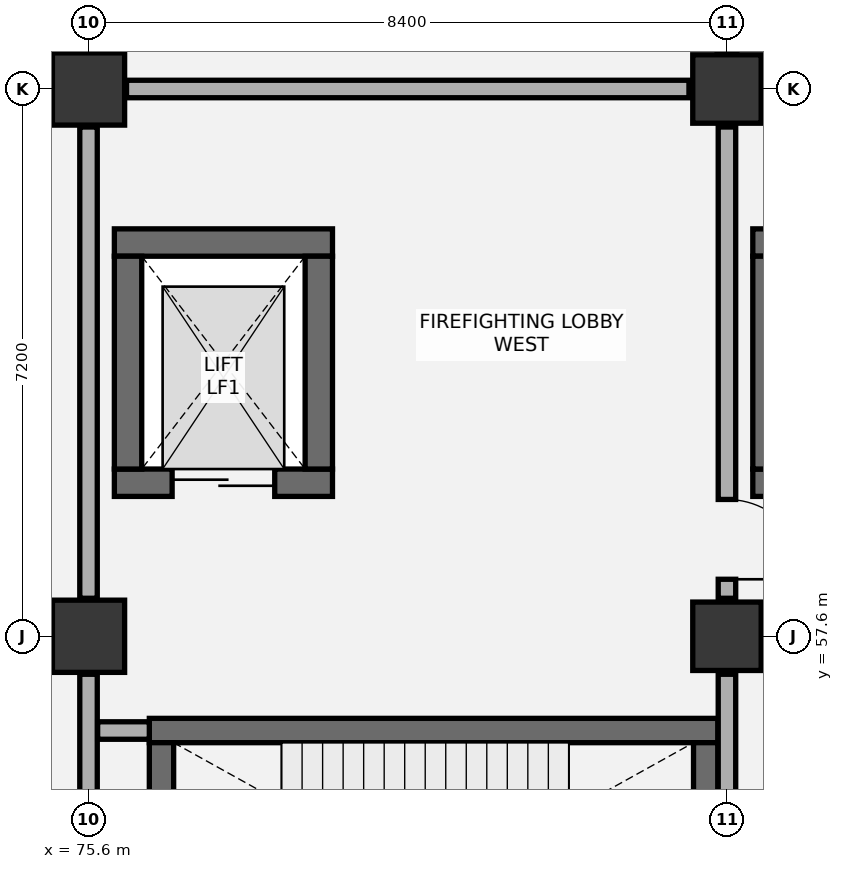
"""IFC4 building model, lengths in metres.
Left out: names, types, materials, properties, quantities, classifications, styles, units other than length and angle.
Written with IfcOpenShell. Run it as: python <this file> out.ifc"""

import sys

from ifc_helpers import new_model, si_unit, direction, frame, frame_2d, origin, origin_2d, place, context, subcontext, project, spatial, rectangle, extrude, element, fill, save


model = new_model("IFC4")
c1 = context("Model", 3, precision=1e-05, world=origin(), true_north=direction((0.0, 1.0)))
c2 = subcontext(c1, "Body", "Model", "MODEL_VIEW")
j1 = project(units=[si_unit("LENGTHUNIT", "METRE"), si_unit("PLANEANGLEUNIT", "RADIAN")], contexts=[c1])
p1 = place(None, origin())
s1 = spatial("IfcSite", under=j1, at=p1, CompositionType="ELEMENT")
p2 = place(p1, origin())
s2 = spatial("IfcBuilding", under=s1, at=p2, CompositionType="ELEMENT")
p3 = place(p2, frame((0.0, 0.0, -4.8)))
s3 = spatial("IfcBuildingStorey", under=s2, at=p3, CompositionType="ELEMENT", Elevation=-4.8)
for number, where, z_axis, x_axis in (
    (1, (75.6, 57.6, 0.0), (0.0, 0.0, 1.0), (1.0, 0.0, 0.0)),
    (2, (75.6, 64.8, 0.0), (0.0, 0.0, 1.0), (1.0, 0.0, 0.0)),
):
    element("IfcColumn", number, at=place(p3, frame(where, z_axis=z_axis, x_axis=x_axis)), inside=s3, PredefinedType="COLUMN", context=c2, shape_type="SweptSolid", body=[
        extrude(rectangle(XDim=0.95, YDim=0.95, at=origin_2d()), origin(), (0.0, 0.0, 1.0), 4.8),
    ])
for number, where, z_axis, x_axis in (
    (3, (84.0, 57.6, 0.0), (0.0, 0.0, 1.0), (1.0, 0.0, 0.0)),
    (4, (84.0, 64.8, 0.0), (0.0, 0.0, 1.0), (1.0, 0.0, 0.0)),
):
    element("IfcColumn", number, at=place(p3, frame(where, z_axis=z_axis, x_axis=x_axis)), inside=s3, PredefinedType="COLUMN", context=c2, shape_type="SweptSolid", body=[
        extrude(rectangle(XDim=0.9, YDim=0.9, at=origin_2d()), origin(), (0.0, 0.0, 1.0), 4.8),
    ])
p4 = place(p3, frame((76.4, 56.36, 0.0), z_axis=(0.0, 0.0, 1.0), x_axis=(1.0, 0.0, 0.0)))
e5 = element("IfcWall", 5, at=p4, inside=s3, PredefinedType="SHEAR", context=c2, shape_type="SweptSolid", body=[
    extrude(rectangle(XDim=7.48, YDim=0.32, at=frame_2d((3.74, 0.0))), origin(), (0.0, 0.0, 1.0), 4.45),
])
for number, where, z_axis, x_axis in (
    (6, (76.56, 52.4, 0.0), (0.0, 0.0, 1.0), (0.0, 1.0, 0.0)),
    (7, (83.72, 52.4, 0.0), (0.0, 0.0, 1.0), (0.0, 1.0, 0.0)),
):
    element("IfcWall", number, at=place(p3, frame(where, z_axis=z_axis, x_axis=x_axis)), inside=s3, PredefinedType="SHEAR", context=c2, shape_type="SweptSolid", body=[
        extrude(rectangle(XDim=3.8, YDim=0.32, at=frame_2d((1.9, 0.0))), origin(), (0.0, 0.0, 1.0), 4.45),
    ])
p5 = place(p3, frame((75.94, 62.78, 0.0), z_axis=(0.0, 0.0, 1.0), x_axis=(1.0, 0.0, 0.0)))
e8 = element("IfcWall", 8, at=p5, inside=s3, PredefinedType="SHEAR", context=c2, shape_type="SweptSolid", body=[
    extrude(rectangle(XDim=2.87, YDim=0.36, at=frame_2d((1.435, 0.0))), origin(), (0.0, 0.0, 1.0), 4.45),
])
p6 = place(p3, frame((75.94, 59.62, 0.0), z_axis=(0.0, 0.0, 1.0), x_axis=(1.0, 0.0, 0.0)))
e9 = element("IfcWall", 9, at=p6, inside=s3, PredefinedType="SHEAR", context=c2, shape_type="SweptSolid", body=[
    extrude(rectangle(XDim=2.87, YDim=0.36, at=frame_2d((1.435, 0.0))), origin(), (0.0, 0.0, 1.0), 4.45),
])
p7 = place(p6, frame((0.76, 0.0, 0.0)))
e10 = element("IfcOpeningElement", 10, at=p7, cuts=e9, PredefinedType="OPENING", context=c2, shape_type="SweptSolid", body=[
    extrude(rectangle(XDim=1.35, YDim=2.2, at=frame_2d((0.675, 1.1))), frame((0.0, 0.19, 0.0), z_axis=(0.0, -1.0, 0.0), x_axis=(1.0, 0.0, 0.0)), (0.0, 0.0, 1.0), 0.38),
])
for number, where, z_axis, x_axis in (
    (11, (76.12, 59.8, 0.0), (0.0, 0.0, 1.0), (0.0, 1.0, 0.0)),
    (12, (78.63, 59.8, 0.0), (0.0, 0.0, 1.0), (0.0, 1.0, 0.0)),
):
    element("IfcWall", number, at=place(p3, frame(where, z_axis=z_axis, x_axis=x_axis)), inside=s3, PredefinedType="SHEAR", context=c2, shape_type="SweptSolid", body=[
        extrude(rectangle(XDim=2.8, YDim=0.36, at=frame_2d((1.4, 0.0))), origin(), (0.0, 0.0, 1.0), 4.45),
    ])
p8 = place(p3, frame((84.34, 62.78, 0.0), z_axis=(0.0, 0.0, 1.0), x_axis=(1.0, 0.0, 0.0)))
e13 = element("IfcWall", 13, at=p8, inside=s3, PredefinedType="SHEAR", context=c2, shape_type="SweptSolid", body=[
    extrude(rectangle(XDim=7.77, YDim=0.36, at=frame_2d((3.885, 0.0))), origin(), (0.0, 0.0, 1.0), 4.45),
])
p9 = place(p3, frame((84.34, 59.62, 0.0), z_axis=(0.0, 0.0, 1.0), x_axis=(1.0, 0.0, 0.0)))
e14 = element("IfcWall", 14, at=p9, inside=s3, PredefinedType="SHEAR", context=c2, shape_type="SweptSolid", body=[
    extrude(rectangle(XDim=2.66, YDim=0.36, at=frame_2d((1.33, 0.0))), origin(), (0.0, 0.0, 1.0), 4.45),
])
p10 = place(p9, frame((0.78, 0.0, 0.0)))
e15 = element("IfcOpeningElement", 15, at=p10, cuts=e14, PredefinedType="OPENING", context=c2, shape_type="SweptSolid", body=[
    extrude(rectangle(XDim=1.1, YDim=2.15, at=frame_2d((0.55, 1.075))), frame((0.0, 0.19, 0.0), z_axis=(0.0, -1.0, 0.0), x_axis=(1.0, 0.0, 0.0)), (0.0, 0.0, 1.0), 0.38),
])
p11 = place(p3, frame((84.52, 59.8, 0.0), z_axis=(0.0, 0.0, 1.0), x_axis=(0.0, 1.0, 0.0)))
e16 = element("IfcWall", 16, at=p11, inside=s3, PredefinedType="SHEAR", context=c2, shape_type="SweptSolid", body=[
    extrude(rectangle(XDim=2.8, YDim=0.36, at=frame_2d((1.4, 0.0))), origin(), (0.0, 0.0, 1.0), 4.45),
])
p12 = place(p3, frame((75.6, 50.9, 0.0), z_axis=(0.0, 0.0, 1.0), x_axis=(0.0, 1.0, 0.0)))
e17 = element("IfcWall", 17, at=p12, inside=s3, PredefinedType="PARTITIONING", context=c2, shape_type="SweptSolid", body=[
    extrude(rectangle(XDim=6.2, YDim=0.23, at=frame_2d((3.1, 0.0))), origin(), (0.0, 0.0, 1.0), 3.645),
])
p13 = place(p12, frame((0.05, 0.0, 0.0)))
e18 = element("IfcOpeningElement", 18, at=p13, cuts=e17, PredefinedType="OPENING", context=c2, shape_type="SweptSolid", body=[
    extrude(rectangle(XDim=1.05, YDim=2.15, at=frame_2d((0.525, 1.075))), frame((0.0, 0.125, 0.0), z_axis=(0.0, -1.0, 0.0), x_axis=(1.0, 0.0, 0.0)), (0.0, 0.0, 1.0), 0.25),
])
p14 = place(p3, frame((75.6, 58.1, 0.0), z_axis=(0.0, 0.0, 1.0), x_axis=(0.0, 1.0, 0.0)))
e19 = element("IfcWall", 19, at=p14, inside=s3, PredefinedType="PARTITIONING", context=c2, shape_type="SweptSolid", body=[
    extrude(rectangle(XDim=6.2, YDim=0.23, at=frame_2d((3.1, 0.0))), origin(), (0.0, 0.0, 1.0), 3.645),
])
p15 = place(p3, frame((84.0, 50.9, 0.0), z_axis=(0.0, 0.0, 1.0), x_axis=(0.0, 1.0, 0.0)))
e20 = element("IfcWall", 20, at=p15, inside=s3, PredefinedType="PARTITIONING", context=c2, shape_type="SweptSolid", body=[
    extrude(rectangle(XDim=6.2, YDim=0.23, at=frame_2d((3.1, 0.0))), origin(), (0.0, 0.0, 1.0), 3.645),
])
p16 = place(p15, frame((0.05, 0.0, 0.0)))
e21 = element("IfcOpeningElement", 21, at=p16, cuts=e20, PredefinedType="OPENING", context=c2, shape_type="SweptSolid", body=[
    extrude(rectangle(XDim=1.05, YDim=2.15, at=frame_2d((0.525, 1.075))), frame((0.0, 0.125, 0.0), z_axis=(0.0, -1.0, 0.0), x_axis=(1.0, 0.0, 0.0)), (0.0, 0.0, 1.0), 0.25),
])
p17 = place(p3, frame((75.72, 56.36, 0.0), z_axis=(0.0, 0.0, 1.0), x_axis=(1.0, 0.0, 0.0)))
e22 = element("IfcWall", 22, at=p17, inside=s3, PredefinedType="PARTITIONING", context=c2, shape_type="SweptSolid", body=[
    extrude(rectangle(XDim=0.68, YDim=0.23, at=frame_2d((0.34, 0.0))), origin(), (0.0, 0.0, 1.0), 4.45),
])
p18 = place(p3, frame((84.0, 58.1, 0.0), z_axis=(0.0, 0.0, 1.0), x_axis=(0.0, 1.0, 0.0)))
e23 = element("IfcWall", 23, at=p18, inside=s3, PredefinedType="PARTITIONING", context=c2, shape_type="SweptSolid", body=[
    extrude(rectangle(XDim=6.2, YDim=0.23, at=frame_2d((3.1, 0.0))), origin(), (0.0, 0.0, 1.0), 3.645),
])
p19 = place(p18, frame((0.25, 0.0, 0.0)))
e24 = element("IfcOpeningElement", 24, at=p19, cuts=e23, PredefinedType="OPENING", context=c2, shape_type="SweptSolid", body=[
    extrude(rectangle(XDim=1.05, YDim=2.15, at=frame_2d((0.525, 1.075))), frame((0.0, 0.125, 0.0), z_axis=(0.0, -1.0, 0.0), x_axis=(1.0, 0.0, 0.0)), (0.0, 0.0, 1.0), 0.25),
])
p20 = place(p3, frame((76.1, 64.8, 0.0), z_axis=(0.0, 0.0, 1.0), x_axis=(1.0, 0.0, 0.0)))
e25 = element("IfcWall", 25, at=p20, inside=s3, PredefinedType="PARTITIONING", context=c2, shape_type="SweptSolid", body=[
    extrude(rectangle(XDim=7.4, YDim=0.23, at=frame_2d((3.7, 0.0))), origin(), (0.0, 0.0, 1.0), 3.545),
])
p21 = place(p7, origin())
e26 = element("IfcDoor", 26, at=p21, inside=s3, OperationType="DOUBLE_DOOR_SLIDING", PredefinedType="DOOR", context=c2, shape_type="SweptSolid", body=[
    extrude(rectangle(XDim=1.35, YDim=2.2, at=frame_2d((0.675, 1.1))), frame((0.0, 0.025, 0.0), z_axis=(0.0, -1.0, 0.0), x_axis=(1.0, 0.0, 0.0)), (0.0, 0.0, 1.0), 0.05),
])
fill(e10, e26)
p22 = place(p19, frame((1.05, 0.0, 0.0), z_axis=(0.0, 0.0, 1.0), x_axis=(-1.0, 0.0, 0.0)))
e27 = element("IfcDoor", 27, at=p22, inside=s3, OperationType="SINGLE_SWING_RIGHT", PredefinedType="DOOR", context=c2, shape_type="SweptSolid", body=[
    extrude(rectangle(XDim=1.05, YDim=2.15, at=frame_2d((0.525, 1.075))), frame((0.0, 0.025, 0.0), z_axis=(0.0, -1.0, 0.0), x_axis=(1.0, 0.0, 0.0)), (0.0, 0.0, 1.0), 0.05),
])
fill(e24, e27)
save(model, sys.argv[1])
